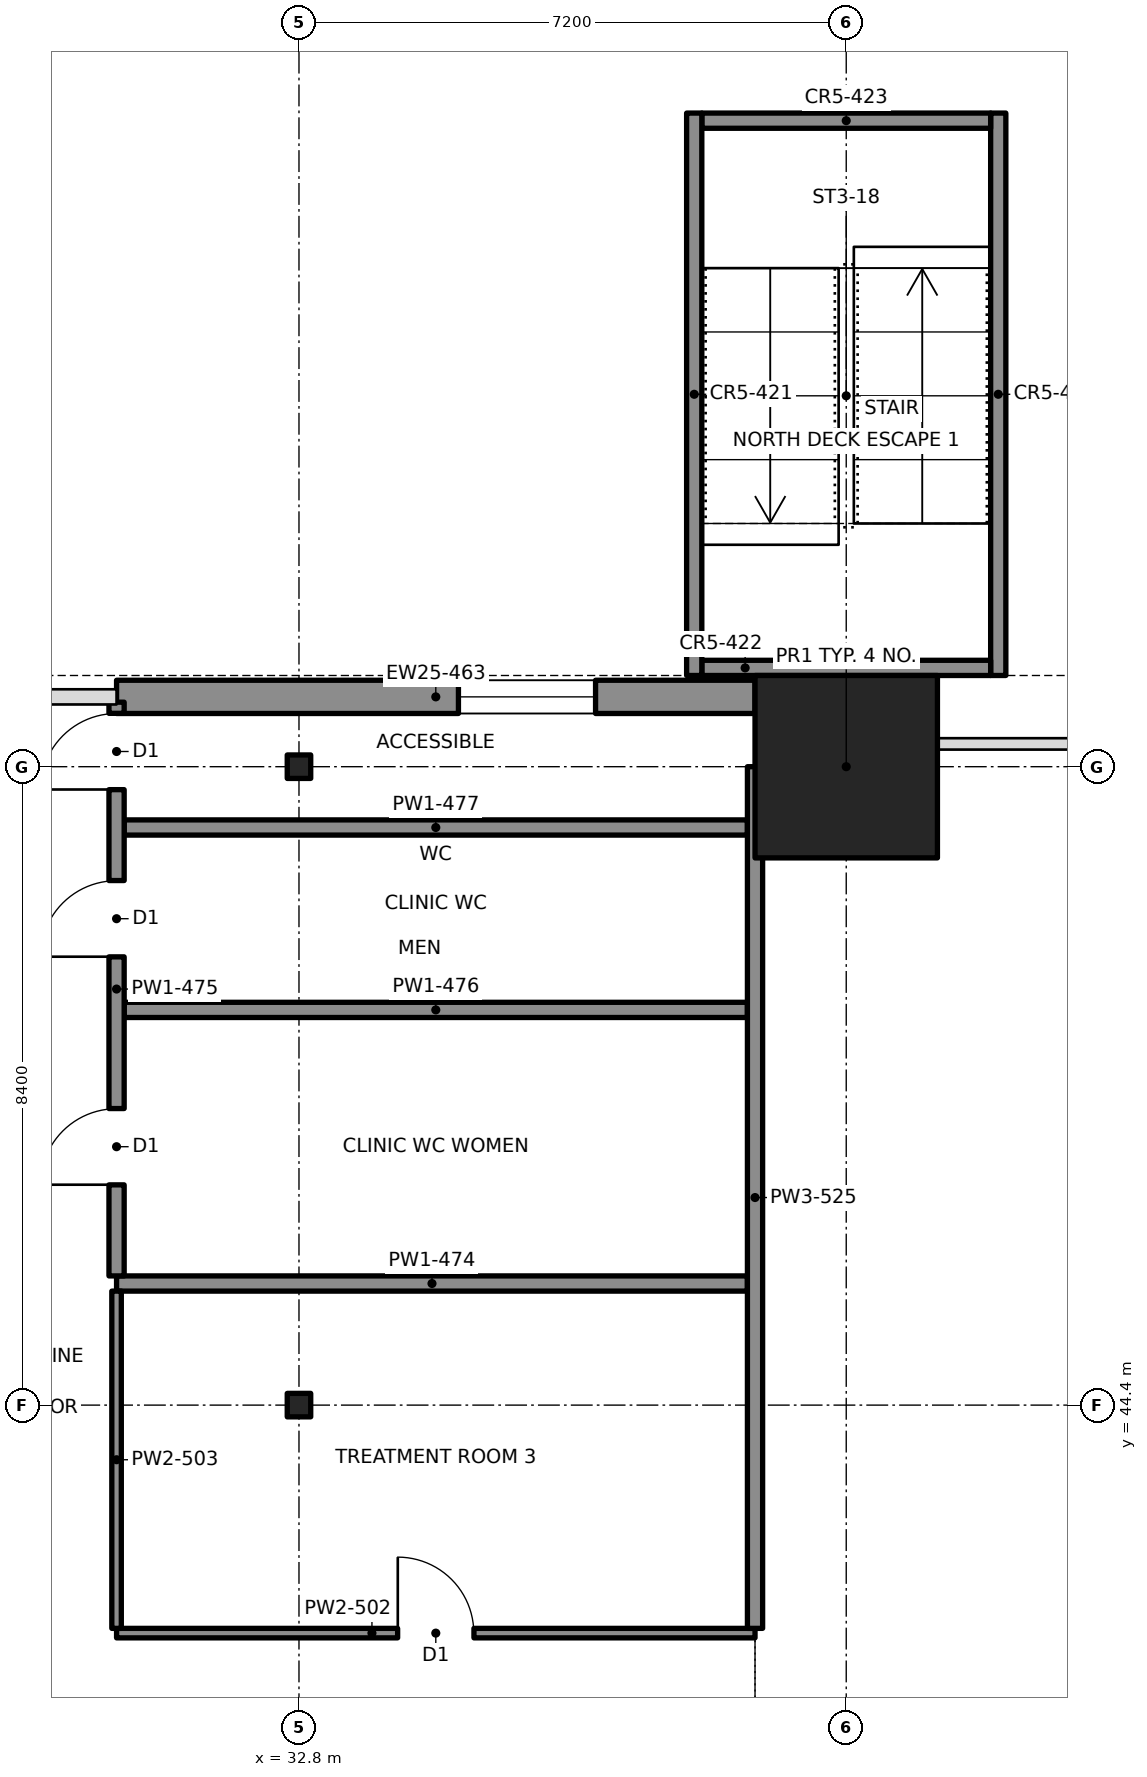
"""IFC4 building model, lengths in metres.
Left out: names, types, materials, properties, quantities, classifications, styles, units other than length and angle.
Written with IfcOpenShell. Run it as: python <this file> out.ifc"""

import sys

from ifc_helpers import new_model, si_unit, direction, frame, frame_2d, origin, origin_2d, place, context, subcontext, project, spatial, rectangle, i_section, extrude, element, fill, save


model = new_model("IFC4")
c1 = context("Model", 3, precision=1e-05, world=origin(), true_north=direction((0.0, 1.0)))
c2 = subcontext(c1, "Body", "Model", "MODEL_VIEW")
j1 = project(units=[si_unit("LENGTHUNIT", "METRE"), si_unit("PLANEANGLEUNIT", "RADIAN")], contexts=[c1])
p1 = place(None, origin())
s1 = spatial("IfcSite", under=j1, at=p1, CompositionType="ELEMENT")
p2 = place(p1, origin())
s2 = spatial("IfcBuilding", under=s1, at=p2, CompositionType="ELEMENT")
p3 = place(p2, frame((0.0, 0.0, 4.4)))
s3 = spatial("IfcBuildingStorey", under=s2, at=p3, CompositionType="ELEMENT", Elevation=4.4)
p4 = place(p3, frame((40.0, 52.8, 0.0), z_axis=(0.0, 0.0, 1.0), x_axis=(1.0, 0.0, 0.0)))
e1 = element("IfcColumn", 1, at=p4, inside=s3, PredefinedType="COLUMN", context=c2, shape_type="SweptSolid", body=[
    extrude(rectangle(XDim=2.4, YDim=2.4, at=origin_2d()), origin(), (0.0, 0.0, 1.0), 4.4),
])
for number, where, z_axis, x_axis in (
    (2, (32.8, 44.4, 0.0), (0.0, 0.0, 1.0), (1.0, 0.0, 0.0)),
    (3, (32.8, 52.8, 0.0), (0.0, 0.0, 1.0), (1.0, 0.0, 0.0)),
):
    element("IfcColumn", number, at=place(p3, frame(where, z_axis=z_axis, x_axis=x_axis)), inside=s3, PredefinedType="COLUMN", context=c2, shape_type="SweptSolid", body=[
        extrude(i_section(OverallWidth=0.309, OverallDepth=0.323, WebThickness=0.014, FlangeThickness=0.023, at=origin_2d()), origin(), (0.0, 0.0, 1.0), 4.4),
    ])
p5 = place(p3, frame((30.4, 53.719, 0.0), z_axis=(0.0, 0.0, 1.0), x_axis=(1.0, 0.0, 0.0)))
e4 = element("IfcWall", 4, at=p5, inside=s3, PredefinedType="SOLIDWALL", context=c2, shape_type="SweptSolid", body=[
    extrude(rectangle(XDim=8.4, YDim=0.438, at=frame_2d((4.2, 0.0))), origin(), (0.0, 0.0, 1.0), 4.4),
])
p6 = place(p5, frame((4.5, 0.0, 0.75)))
e5 = element("IfcOpeningElement", 5, at=p6, cuts=e4, PredefinedType="OPENING", context=c2, shape_type="SweptSolid", body=[
    extrude(rectangle(XDim=1.8, YDim=2.8, at=frame_2d((0.9, 1.4))), frame((0.0, 0.229, 0.0), z_axis=(0.0, -1.0, 0.0), x_axis=(1.0, 0.0, 0.0)), (0.0, 0.0, 1.0), 0.458),
])
for number, where, z_axis, x_axis in (
    (6, (38.0, 54.0, 0.0), (0.0, 0.0, 1.0), (0.0, 1.0, 0.0)),
    (7, (42.0, 61.4, 0.0), (0.0, 0.0, 1.0), (0.0, -1.0, 0.0)),
):
    element("IfcWall", number, at=place(p3, frame(where, z_axis=z_axis, x_axis=x_axis)), inside=s3, PredefinedType="SOLIDWALL", context=c2, shape_type="SweptSolid", body=[
        extrude(rectangle(XDim=7.4, YDim=0.2, at=frame_2d((3.7, 0.0))), origin(), (0.0, 0.0, 1.0), 4.4),
    ])
for number, where, z_axis, x_axis in (
    (8, (38.1, 54.1, 0.0), (0.0, 0.0, 1.0), (1.0, 0.0, 0.0)),
    (9, (38.1, 61.3, 0.0), (0.0, 0.0, 1.0), (1.0, 0.0, 0.0)),
):
    element("IfcWall", number, at=place(p3, frame(where, z_axis=z_axis, x_axis=x_axis)), inside=s3, PredefinedType="SOLIDWALL", context=c2, shape_type="SweptSolid", body=[
        extrude(rectangle(XDim=3.8, YDim=0.2, at=frame_2d((1.9, 0.0))), origin(), (0.0, 0.0, 1.0), 4.4),
    ])
p7 = place(p3, frame((30.4, 41.4, 0.0), z_axis=(0.0, 0.0, 1.0), x_axis=(1.0, 0.0, 0.0)))
e10 = element("IfcWall", 10, at=p7, inside=s3, PredefinedType="PARTITIONING", context=c2, shape_type="SweptSolid", body=[
    extrude(rectangle(XDim=8.4, YDim=0.125, at=frame_2d((4.2, 0.0))), origin(), (0.0, 0.0, 1.0), 3.65),
])
p8 = place(p7, frame((3.7, 0.0, 0.0)))
e11 = element("IfcOpeningElement", 11, at=p8, cuts=e10, PredefinedType="OPENING", context=c2, shape_type="SweptSolid", body=[
    extrude(rectangle(XDim=1.0, YDim=2.1, at=frame_2d((0.5, 1.05))), frame((0.0, 0.073, 0.0), z_axis=(0.0, -1.0, 0.0), x_axis=(1.0, 0.0, 0.0)), (0.0, 0.0, 1.0), 0.145),
])
p9 = place(p3, frame((30.4, 46.0, 0.0), z_axis=(0.0, 0.0, 1.0), x_axis=(1.0, 0.0, 0.0)))
e12 = element("IfcWall", 12, at=p9, inside=s3, PredefinedType="PARTITIONING", context=c2, shape_type="SweptSolid", body=[
    extrude(rectangle(XDim=8.3, YDim=0.2, at=frame_2d((4.15, 0.0))), origin(), (0.0, 0.0, 1.0), 3.65),
])
for number, where, z_axis, x_axis in (
    (13, (30.5, 49.6, 0.0), (0.0, 0.0, 1.0), (1.0, 0.0, 0.0)),
    (14, (30.5, 52.0, 0.0), (0.0, 0.0, 1.0), (1.0, 0.0, 0.0)),
):
    element("IfcWall", number, at=place(p3, frame(where, z_axis=z_axis, x_axis=x_axis)), inside=s3, PredefinedType="PARTITIONING", context=c2, shape_type="SweptSolid", body=[
        extrude(rectangle(XDim=8.2, YDim=0.2, at=frame_2d((4.1, 0.0))), origin(), (0.0, 0.0, 1.0), 3.65),
    ])
p10 = place(p3, frame((30.4, 41.462, 0.0), z_axis=(0.0, 0.0, 1.0), x_axis=(0.0, 1.0, 0.0)))
e15 = element("IfcWall", 15, at=p10, inside=s3, PredefinedType="PARTITIONING", context=c2, shape_type="SweptSolid", body=[
    extrude(rectangle(XDim=4.438, YDim=0.125, at=frame_2d((2.219, 0.0))), origin(), (0.0, 0.0, 1.0), 3.65),
])
p11 = place(p3, frame((30.4, 46.1, 0.0), z_axis=(0.0, 0.0, 1.0), x_axis=(0.0, 1.0, 0.0)))
e16 = element("IfcWall", 16, at=p11, inside=s3, PredefinedType="PARTITIONING", context=c2, shape_type="SweptSolid", body=[
    extrude(rectangle(XDim=7.549, YDim=0.2, at=frame_2d((3.774, 0.0))), origin(), (0.0, 0.0, 1.0), 3.65),
])
p12 = place(p11, frame((1.2, 0.0, 0.0)))
e17 = element("IfcOpeningElement", 17, at=p12, cuts=e16, PredefinedType="OPENING", context=c2, shape_type="SweptSolid", body=[
    extrude(rectangle(XDim=1.0, YDim=2.1, at=frame_2d((0.5, 1.05))), frame((0.0, 0.11, 0.0), z_axis=(0.0, -1.0, 0.0), x_axis=(1.0, 0.0, 0.0)), (0.0, 0.0, 1.0), 0.22),
])
p13 = place(p11, frame((4.2, 0.0, 0.0)))
e18 = element("IfcOpeningElement", 18, at=p13, cuts=e16, PredefinedType="OPENING", context=c2, shape_type="SweptSolid", body=[
    extrude(rectangle(XDim=1.0, YDim=2.1, at=frame_2d((0.5, 1.05))), frame((0.0, 0.11, 0.0), z_axis=(0.0, -1.0, 0.0), x_axis=(1.0, 0.0, 0.0)), (0.0, 0.0, 1.0), 0.22),
])
p14 = place(p11, frame((6.4, 0.0, 0.0)))
e19 = element("IfcOpeningElement", 19, at=p14, cuts=e16, PredefinedType="OPENING", context=c2, shape_type="SweptSolid", body=[
    extrude(rectangle(XDim=1.0, YDim=2.1, at=frame_2d((0.5, 1.05))), frame((0.0, 0.11, 0.0), z_axis=(0.0, -1.0, 0.0), x_axis=(1.0, 0.0, 0.0)), (0.0, 0.0, 1.0), 0.22),
])
p15 = place(p3, frame((38.8, 41.462, 0.0), z_axis=(0.0, 0.0, 1.0), x_axis=(0.0, 1.0, 0.0)))
e20 = element("IfcWall", 20, at=p15, inside=s3, PredefinedType="PARTITIONING", context=c2, shape_type="SweptSolid", body=[
    extrude(rectangle(XDim=11.338, YDim=0.2, at=frame_2d((5.669, 0.0))), origin(), (0.0, 0.0, 1.0), 3.65),
])
p16 = place(p6, origin())
e21 = element("IfcWindow", 21, at=p16, inside=s3, PartitioningType="SINGLE_PANEL", PredefinedType="WINDOW", context=c2, shape_type="SweptSolid", body=[
    extrude(rectangle(XDim=1.8, YDim=2.8, at=frame_2d((0.9, 1.4))), frame((0.0, 0.03, 0.0), z_axis=(0.0, -1.0, 0.0), x_axis=(1.0, 0.0, 0.0)), (0.0, 0.0, 1.0), 0.06),
])
fill(e5, e21)
p17 = place(p8, origin())
e22 = element("IfcDoor", 22, at=p17, inside=s3, OperationType="SINGLE_SWING_LEFT", PredefinedType="DOOR", context=c2, shape_type="SweptSolid", body=[
    extrude(rectangle(XDim=1.0, YDim=2.1, at=frame_2d((0.5, 1.05))), frame((0.0, 0.025, 0.0), z_axis=(0.0, -1.0, 0.0), x_axis=(1.0, 0.0, 0.0)), (0.0, 0.0, 1.0), 0.05),
])
fill(e11, e22)
p18 = place(p12, origin())
e23 = element("IfcDoor", 23, at=p18, inside=s3, OperationType="SINGLE_SWING_LEFT", PredefinedType="DOOR", context=c2, shape_type="SweptSolid", body=[
    extrude(rectangle(XDim=1.0, YDim=2.1, at=frame_2d((0.5, 1.05))), frame((0.0, 0.025, 0.0), z_axis=(0.0, -1.0, 0.0), x_axis=(1.0, 0.0, 0.0)), (0.0, 0.0, 1.0), 0.05),
])
fill(e17, e23)
p19 = place(p13, origin())
e24 = element("IfcDoor", 24, at=p19, inside=s3, OperationType="SINGLE_SWING_LEFT", PredefinedType="DOOR", context=c2, shape_type="SweptSolid", body=[
    extrude(rectangle(XDim=1.0, YDim=2.1, at=frame_2d((0.5, 1.05))), frame((0.0, 0.025, 0.0), z_axis=(0.0, -1.0, 0.0), x_axis=(1.0, 0.0, 0.0)), (0.0, 0.0, 1.0), 0.05),
])
fill(e18, e24)
p20 = place(p14, origin())
e25 = element("IfcDoor", 25, at=p20, inside=s3, OperationType="SINGLE_SWING_LEFT", PredefinedType="DOOR", context=c2, shape_type="SweptSolid", body=[
    extrude(rectangle(XDim=1.0, YDim=2.1, at=frame_2d((0.5, 1.05))), frame((0.0, 0.025, 0.0), z_axis=(0.0, -1.0, 0.0), x_axis=(1.0, 0.0, 0.0)), (0.0, 0.0, 1.0), 0.05),
])
fill(e19, e25)
save(model, sys.argv[1])
